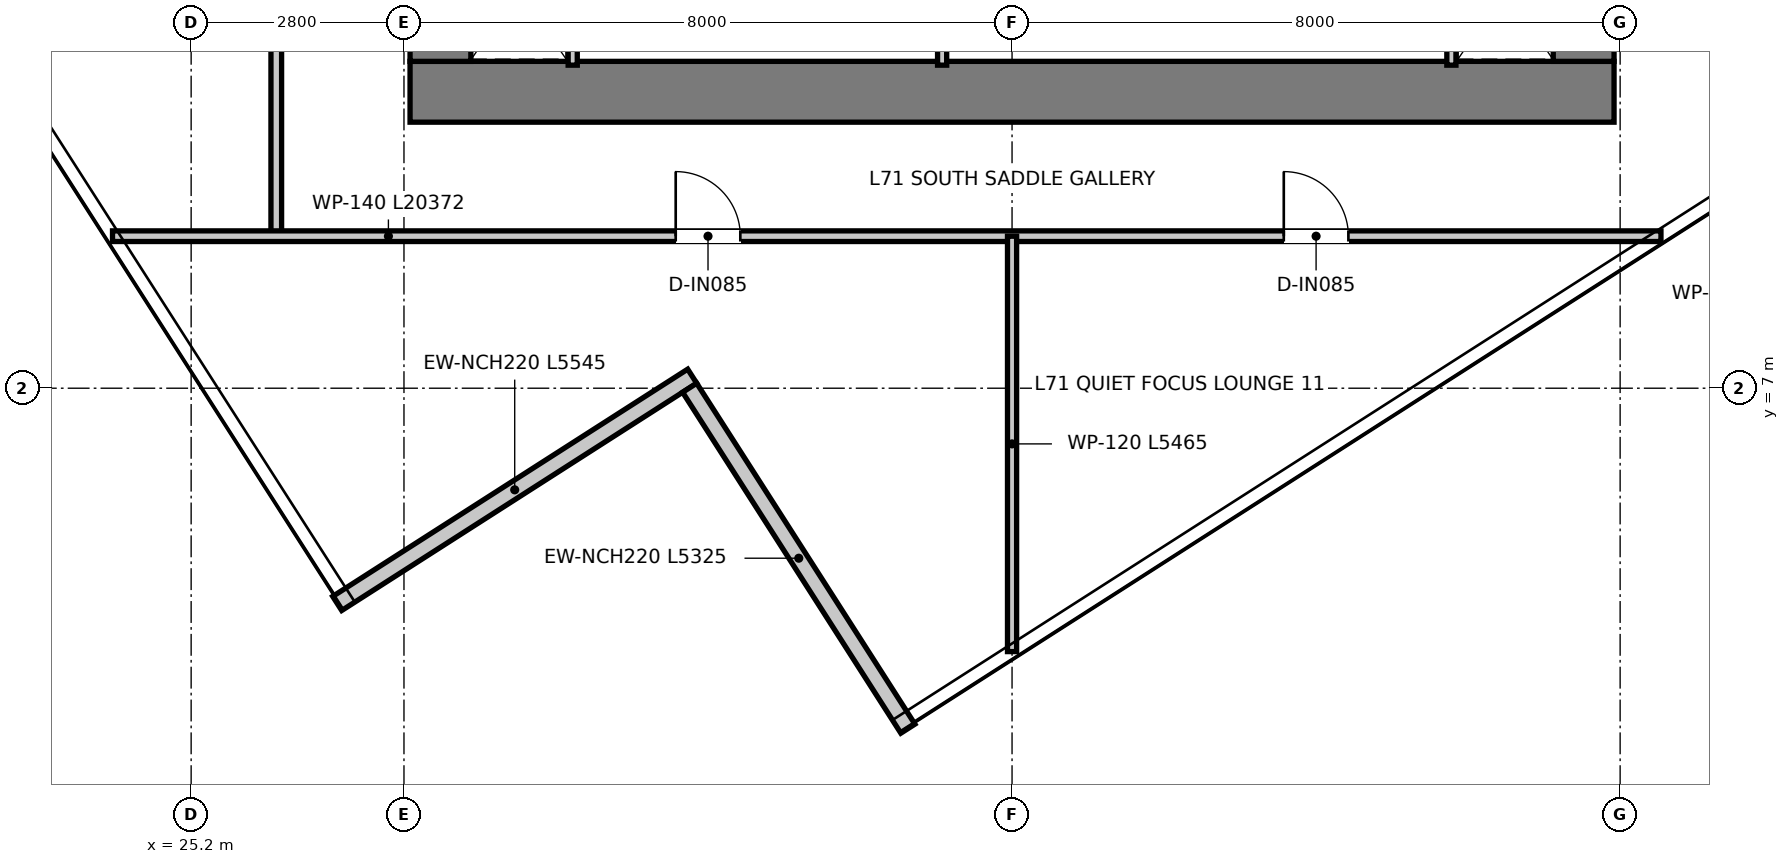
"""IFC4 building model, lengths in metres.
Left out: names, types, materials, properties, quantities, classifications, styles, units other than length and angle.
Written with IfcOpenShell. Run it as: python <this file> out.ifc"""

import sys

from ifc_helpers import new_model, si_unit, direction, frame, frame_2d, origin, place, context, subcontext, project, spatial, rectangle, extrude, element, fill, save


model = new_model("IFC4")
c1 = context("Model", 3, precision=1e-05, world=origin(), true_north=direction((0.0, 1.0)))
c2 = subcontext(c1, "Body", "Model", "MODEL_VIEW")
j1 = project(units=[si_unit("LENGTHUNIT", "METRE"), si_unit("PLANEANGLEUNIT", "RADIAN")], contexts=[c1])
p1 = place(None, origin())
s1 = spatial("IfcSite", under=j1, at=p1, CompositionType="ELEMENT")
p2 = place(p1, origin())
s2 = spatial("IfcBuilding", under=s1, at=p2, CompositionType="ELEMENT")
p3 = place(p2, frame((0.0, 0.0, 291.1)))
s3 = spatial("IfcBuildingStorey", under=s2, at=p3, CompositionType="ELEMENT", Elevation=291.1)
p4 = place(p3, frame((28.08, 10.9, 0.0), z_axis=(0.0, 0.0, 1.0), x_axis=(1.0, 0.0, 0.0)))
e1 = element("IfcWall", 1, at=p4, inside=s3, PredefinedType="SHEAR", context=c2, shape_type="SweptSolid", body=[
    extrude(rectangle(XDim=15.84, YDim=0.8, at=frame_2d((7.92, 0.0))), origin(), (0.0, 0.0, 1.0), 3.95),
])
for number, where, z_axis, x_axis in (
    (2, (28.48, 11.3, 0.0), (0.0, 0.0, 1.0), (0.0, 1.0, 0.0)),
    (3, (43.52, 11.3, 0.0), (0.0, 0.0, 1.0), (0.0, 1.0, 0.0)),
):
    element("IfcWall", number, at=place(p3, frame(where, z_axis=z_axis, x_axis=x_axis)), inside=s3, PredefinedType="SHEAR", context=c2, shape_type="SweptSolid", body=[
        extrude(rectangle(XDim=14.7, YDim=0.8, at=frame_2d((7.35, 0.0))), origin(), (0.0, 0.0, 1.0), 3.95),
    ])
p5 = place(p3, frame((27.122, 4.168, 0.0), z_axis=(0.0, 0.0, 1.0), x_axis=(0.842222620948, 0.539129907131, 0.0)))
e4 = element("IfcWall", 4, at=p5, inside=s3, PredefinedType="ELEMENTEDWALL", context=c2, shape_type="SweptSolid", body=[
    extrude(rectangle(XDim=5.545, YDim=0.22, at=frame_2d((2.772, 0.0))), origin(), (0.0, 0.0, 1.0), 3.67),
])
p6 = place(p3, frame((31.759, 7.006, 0.0), z_axis=(0.0, 0.0, 1.0), x_axis=(0.539157771194, -0.842204783744, 0.0)))
e5 = element("IfcWall", 5, at=p6, inside=s3, PredefinedType="ELEMENTEDWALL", context=c2, shape_type="SweptSolid", body=[
    extrude(rectangle(XDim=5.325, YDim=0.22, at=frame_2d((2.663, 0.0))), origin(), (0.0, 0.0, 1.0), 3.67),
])
for number, where, z_axis, x_axis in (
    (6, (30.22, 11.25, 0.0), (0.0, 0.0, 1.0), (0.0, 1.0, 0.0)),
    (7, (41.78, 11.25, 0.0), (0.0, 0.0, 1.0), (0.0, 1.0, 0.0)),
):
    element("IfcWall", number, at=place(p3, frame(where, z_axis=z_axis, x_axis=x_axis)), inside=s3, PredefinedType="PARTITIONING", context=c2, shape_type="SweptSolid", body=[
        extrude(rectangle(XDim=1.97, YDim=0.12, at=frame_2d((0.985, 0.0))), origin(), (0.0, 0.0, 1.0), 3.67),
    ])
p7 = place(p3, frame((35.08, 11.25, 0.0), z_axis=(0.0, 0.0, 1.0), x_axis=(0.0, 1.0, 0.0)))
e8 = element("IfcWall", 8, at=p7, inside=s3, PredefinedType="PARTITIONING", context=c2, shape_type="SweptSolid", body=[
    extrude(rectangle(XDim=1.97, YDim=0.12, at=frame_2d((0.985, 0.0))), origin(), (0.0, 0.0, 1.0), 3.67),
])
p8 = place(p7, frame((0.545, 0.0, 0.0)))
e9 = element("IfcOpeningElement", 9, at=p8, cuts=e8, PredefinedType="OPENING", context=c2, shape_type="SweptSolid", body=[
    extrude(rectangle(XDim=0.85, YDim=2.1, at=frame_2d((0.425, 1.05))), frame((0.0, 0.07, 0.0), z_axis=(0.0, -1.0, 0.0), x_axis=(1.0, 0.0, 0.0)), (0.0, 0.0, 1.0), 0.14),
])
p9 = place(p3, frame((26.32, 9.0, 0.0), z_axis=(0.0, 0.0, 1.0), x_axis=(0.0, 1.0, 0.0)))
e10 = element("IfcWall", 10, at=p9, inside=s3, PredefinedType="PARTITIONING", context=c2, shape_type="SweptSolid", body=[
    extrude(rectangle(XDim=19.66, YDim=0.14, at=frame_2d((9.83, 0.0))), origin(), (0.0, 0.0, 1.0), 3.13),
])
p10 = place(p9, frame((18.3, 0.0, 0.0)))
e11 = element("IfcOpeningElement", 11, at=p10, cuts=e10, PredefinedType="OPENING", context=c2, shape_type="SweptSolid", body=[
    extrude(rectangle(XDim=0.9, YDim=2.1, at=frame_2d((0.45, 1.05))), frame((0.0, 0.08, 0.0), z_axis=(0.0, -1.0, 0.0), x_axis=(1.0, 0.0, 0.0)), (0.0, 0.0, 1.0), 0.16),
])
p11 = place(p9, frame((12.71, 0.0, 0.0)))
e12 = element("IfcOpeningElement", 12, at=p11, cuts=e10, PredefinedType="OPENING", context=c2, shape_type="SweptSolid", body=[
    extrude(rectangle(XDim=0.9, YDim=2.1, at=frame_2d((0.45, 1.05))), frame((0.0, 0.08, 0.0), z_axis=(0.0, -1.0, 0.0), x_axis=(1.0, 0.0, 0.0)), (0.0, 0.0, 1.0), 0.16),
])
p12 = place(p3, frame((24.166, 9.0, 0.0), z_axis=(0.0, 0.0, 1.0), x_axis=(1.0, 0.0, 0.0)))
e13 = element("IfcWall", 13, at=p12, inside=s3, PredefinedType="PARTITIONING", context=c2, shape_type="SweptSolid", body=[
    extrude(rectangle(XDim=20.372, YDim=0.14, at=frame_2d((10.186, 0.0))), origin(), (0.0, 0.0, 1.0), 3.67),
])
p13 = place(p12, frame((7.409, 0.0, 0.0)))
e14 = element("IfcOpeningElement", 14, at=p13, cuts=e13, PredefinedType="OPENING", context=c2, shape_type="SweptSolid", body=[
    extrude(rectangle(XDim=0.85, YDim=2.1, at=frame_2d((0.425, 1.05))), frame((0.0, 0.08, 0.0), z_axis=(0.0, -1.0, 0.0), x_axis=(1.0, 0.0, 0.0)), (0.0, 0.0, 1.0), 0.16),
])
p14 = place(p12, frame((15.409, 0.0, 0.0)))
e15 = element("IfcOpeningElement", 15, at=p14, cuts=e13, PredefinedType="OPENING", context=c2, shape_type="SweptSolid", body=[
    extrude(rectangle(XDim=0.85, YDim=2.1, at=frame_2d((0.425, 1.05))), frame((0.0, 0.08, 0.0), z_axis=(0.0, -1.0, 0.0), x_axis=(1.0, 0.0, 0.0)), (0.0, 0.0, 1.0), 0.16),
])
p15 = place(p3, frame((36.0, 3.535, 0.0), z_axis=(0.0, 0.0, 1.0), x_axis=(0.0, 1.0, 0.0)))
e16 = element("IfcWall", 16, at=p15, inside=s3, PredefinedType="PARTITIONING", context=c2, shape_type="SweptSolid", body=[
    extrude(rectangle(XDim=5.465, YDim=0.12, at=frame_2d((2.732, 0.0))), origin(), (0.0, 0.0, 1.0), 3.67),
])
p16 = place(p13, origin())
e17 = element("IfcDoor", 17, at=p16, inside=s3, OperationType="SINGLE_SWING_LEFT", PredefinedType="DOOR", context=c2, shape_type="SweptSolid", body=[
    extrude(rectangle(XDim=0.85, YDim=2.1, at=frame_2d((0.425, 1.05))), frame((0.0, 0.025, 0.0), z_axis=(0.0, -1.0, 0.0), x_axis=(1.0, 0.0, 0.0)), (0.0, 0.0, 1.0), 0.05),
])
fill(e14, e17)
p17 = place(p14, origin())
e18 = element("IfcDoor", 18, at=p17, inside=s3, OperationType="SINGLE_SWING_LEFT", PredefinedType="DOOR", context=c2, shape_type="SweptSolid", body=[
    extrude(rectangle(XDim=0.85, YDim=2.1, at=frame_2d((0.425, 1.05))), frame((0.0, 0.025, 0.0), z_axis=(0.0, -1.0, 0.0), x_axis=(1.0, 0.0, 0.0)), (0.0, 0.0, 1.0), 0.05),
])
fill(e15, e18)
save(model, sys.argv[1])
